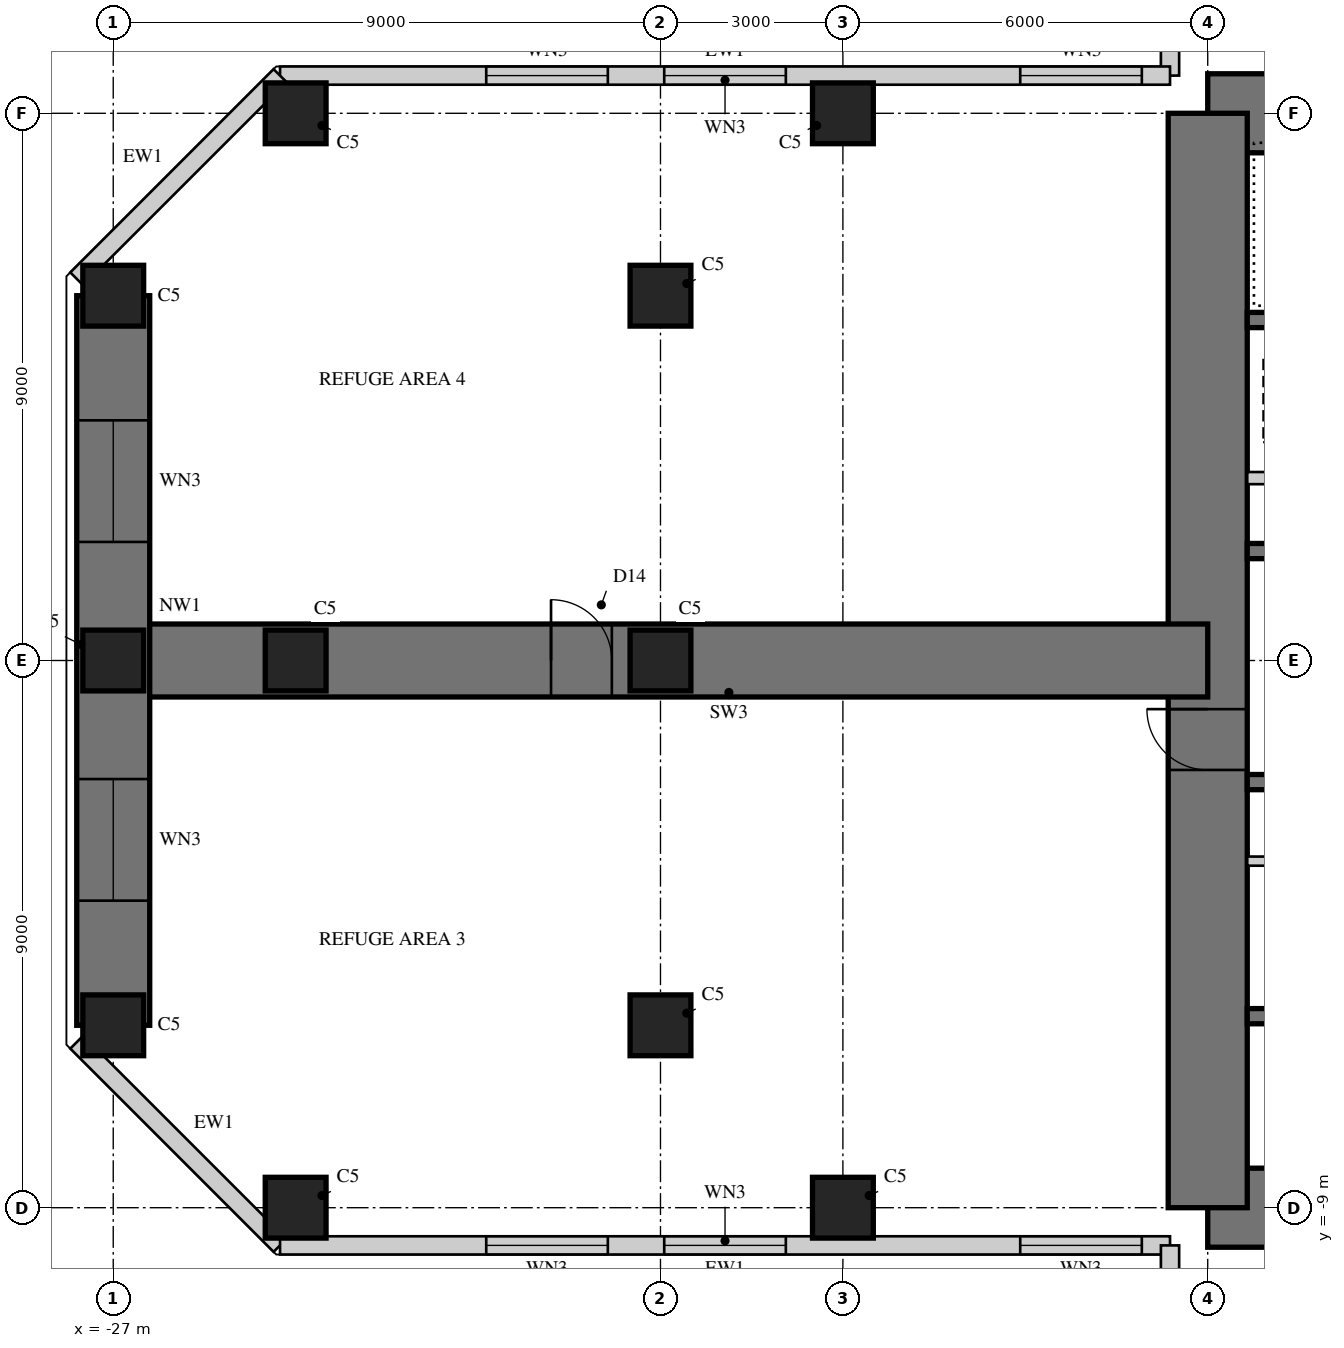
"""IFC4 building model, lengths in metres.
Left out: names, types, materials, properties, quantities, classifications, styles, units other than length and angle.
Written with IfcOpenShell. Run it as: python <this file> out.ifc"""

import sys

from ifc_helpers import new_model, si_unit, direction, frame, frame_2d, origin, origin_2d, place, context, subcontext, project, spatial, rectangle, hollow_rectangle, extrude, element, fill, save


model = new_model("IFC4")
c1 = context("Model", 3, precision=1e-05, world=origin(), true_north=direction((0.0, 1.0)))
c2 = subcontext(c1, "Body", "Model", "MODEL_VIEW")
j1 = project(units=[si_unit("LENGTHUNIT", "METRE"), si_unit("PLANEANGLEUNIT", "RADIAN")], contexts=[c1])
p1 = place(None, origin())
s1 = spatial("IfcSite", under=j1, at=p1, CompositionType="ELEMENT")
p2 = place(p1, origin())
s2 = spatial("IfcBuilding", under=s1, at=p2, CompositionType="ELEMENT")
p3 = place(p2, frame((0.0, 0.0, 164.5)))
s3 = spatial("IfcBuildingStorey", under=s2, at=p3, CompositionType="ELEMENT", Elevation=164.5)
p4 = place(p3, frame((9.0, 9.0, 0.0), z_axis=(0.0, 0.0, 1.0), x_axis=(-1.0, 0.0, 0.0)))
e1 = element("IfcWall", 1, at=p4, inside=s3, PredefinedType="SHEAR", context=c2, shape_type="SweptSolid", body=[
    extrude(rectangle(XDim=18.0, YDim=1.3, at=frame_2d((9.0, 0.0))), origin(), (0.0, 0.0, 1.0), 5.0),
])
p5 = place(p4, frame((9.8, 0.0, 0.0)))
e2 = element("IfcOpeningElement", 2, at=p5, cuts=e1, PredefinedType="OPENING", context=c2, shape_type="SweptSolid", body=[
    extrude(rectangle(XDim=1.0, YDim=2.4, at=frame_2d((0.5, 1.2))), frame((0.0, 0.66, 0.0), z_axis=(0.0, -1.0, 0.0), x_axis=(1.0, 0.0, 0.0)), (0.0, 0.0, 1.0), 1.32),
])
p6 = place(p3, frame((-9.0, -9.0, 0.0), z_axis=(0.0, 0.0, 1.0), x_axis=(1.0, 0.0, 0.0)))
e3 = element("IfcWall", 3, at=p6, inside=s3, PredefinedType="SHEAR", context=c2, shape_type="SweptSolid", body=[
    extrude(rectangle(XDim=18.0, YDim=1.3, at=frame_2d((9.0, 0.0))), origin(), (0.0, 0.0, 1.0), 5.0),
])
p7 = place(p6, frame((9.8, 0.0, 0.0)))
e4 = element("IfcOpeningElement", 4, at=p7, cuts=e3, PredefinedType="OPENING", context=c2, shape_type="SweptSolid", body=[
    extrude(rectangle(XDim=1.0, YDim=2.4, at=frame_2d((0.5, 1.2))), frame((0.0, 0.66, 0.0), z_axis=(0.0, -1.0, 0.0), x_axis=(1.0, 0.0, 0.0)), (0.0, 0.0, 1.0), 1.32),
])
p8 = place(p3, frame((-9.0, 9.0, 0.0), z_axis=(0.0, 0.0, 1.0), x_axis=(0.0, -1.0, 0.0)))
e5 = element("IfcWall", 5, at=p8, inside=s3, PredefinedType="SHEAR", context=c2, shape_type="SweptSolid", body=[
    extrude(rectangle(XDim=18.0, YDim=1.3, at=frame_2d((9.0, 0.0))), origin(), (0.0, 0.0, 1.0), 5.0),
])
p9 = place(p8, frame((9.8, 0.0, 0.0)))
e6 = element("IfcOpeningElement", 6, at=p9, cuts=e5, PredefinedType="OPENING", context=c2, shape_type="SweptSolid", body=[
    extrude(rectangle(XDim=1.0, YDim=2.4, at=frame_2d((0.5, 1.2))), frame((0.0, 0.66, 0.0), z_axis=(0.0, -1.0, 0.0), x_axis=(1.0, 0.0, 0.0)), (0.0, 0.0, 1.0), 1.32),
])
p10 = place(p3, frame((-2.125, 1.8, 0.0), z_axis=(0.0, 0.0, 1.0), x_axis=(-1.0, 0.0, 0.0)))
e7 = element("IfcWall", 7, at=p10, inside=s3, PredefinedType="SHEAR", context=c2, shape_type="SweptSolid", body=[
    extrude(rectangle(XDim=6.225, YDim=0.25, at=frame_2d((3.113, 0.0))), origin(), (0.0, 0.0, 1.0), 5.0),
])
p11 = place(p3, frame((-2.125, 5.6, 0.0), z_axis=(0.0, 0.0, 1.0), x_axis=(-1.0, 0.0, 0.0)))
e8 = element("IfcWall", 8, at=p11, inside=s3, PredefinedType="SHEAR", context=c2, shape_type="SweptSolid", body=[
    extrude(rectangle(XDim=6.225, YDim=0.25, at=frame_2d((3.113, 0.0))), origin(), (0.0, 0.0, 1.0), 5.0),
])
p12 = place(p11, frame((0.175, 0.0, 0.0)))
e9 = element("IfcOpeningElement", 9, at=p12, cuts=e8, PredefinedType="OPENING", context=c2, shape_type="SweptSolid", body=[
    extrude(rectangle(XDim=1.0, YDim=2.1, at=frame_2d((0.5, 1.05))), frame((0.0, 0.135, 0.0), z_axis=(0.0, -1.0, 0.0), x_axis=(1.0, 0.0, 0.0)), (0.0, 0.0, 1.0), 0.27),
])
p13 = place(p3, frame((-5.725, 3.0, 0.0), z_axis=(0.0, 0.0, 1.0), x_axis=(-1.0, 0.0, 0.0)))
e10 = element("IfcWall", 10, at=p13, inside=s3, PredefinedType="PARTITIONING", context=c2, shape_type="SweptSolid", body=[
    extrude(rectangle(XDim=2.625, YDim=0.2, at=frame_2d((1.312, 0.0))), origin(), (0.0, 0.0, 1.0), 5.0),
])
for number, where, z_axis, x_axis in (
    (11, (-1.925, -2.0, 0.0), (0.0, 0.0, 1.0), (-1.0, 0.0, 0.0)),
    (12, (-1.925, -5.85, 0.0), (0.0, 0.0, 1.0), (-1.0, 0.0, 0.0)),
):
    element("IfcWall", number, at=place(p3, frame(where, z_axis=z_axis, x_axis=x_axis)), inside=s3, PredefinedType="SHEAR", context=c2, shape_type="SweptSolid", body=[
        extrude(rectangle(XDim=6.425, YDim=0.25, at=frame_2d((3.212, 0.0))), origin(), (0.0, 0.0, 1.0), 5.0),
    ])
p14 = place(p3, frame((-1.925, -3.3, 0.0), z_axis=(0.0, 0.0, 1.0), x_axis=(-1.0, 0.0, 0.0)))
e13 = element("IfcWall", 13, at=p14, inside=s3, PredefinedType="PARTITIONING", context=c2, shape_type="SweptSolid", body=[
    extrude(rectangle(XDim=6.425, YDim=0.15, at=frame_2d((3.212, 0.0))), origin(), (0.0, 0.0, 1.0), 5.0),
])
p15 = place(p14, frame((0.075, 0.0, 0.0)))
e14 = element("IfcOpeningElement", 14, at=p15, cuts=e13, PredefinedType="OPENING", context=c2, shape_type="SweptSolid", body=[
    extrude(rectangle(XDim=0.8, YDim=2.1, at=frame_2d((0.4, 1.05))), frame((0.0, 0.085, 0.0), z_axis=(0.0, -1.0, 0.0), x_axis=(1.0, 0.0, 0.0)), (0.0, 0.0, 1.0), 0.17),
])
p16 = place(p14, frame((3.675, 0.0, 0.0)))
e15 = element("IfcOpeningElement", 15, at=p16, cuts=e13, PredefinedType="OPENING", context=c2, shape_type="SweptSolid", body=[
    extrude(rectangle(XDim=0.8, YDim=2.1, at=frame_2d((0.4, 1.05))), frame((0.0, 0.085, 0.0), z_axis=(0.0, -1.0, 0.0), x_axis=(1.0, 0.0, 0.0)), (0.0, 0.0, 1.0), 0.17),
])
p17 = place(p3, frame((-9.0, 0.0, 0.0), z_axis=(0.0, 0.0, 1.0), x_axis=(-1.0, 0.0, 0.0)))
e16 = element("IfcWall", 16, at=p17, inside=s3, PredefinedType="SHEAR", context=c2, shape_type="SweptSolid", body=[
    extrude(rectangle(XDim=18.0, YDim=1.2, at=frame_2d((9.0, 0.0))), origin(), (0.0, 0.0, 1.0), 5.0),
])
p18 = place(p17, frame((9.8, 0.0, 0.0)))
e17 = element("IfcOpeningElement", 17, at=p18, cuts=e16, PredefinedType="OPENING", context=c2, shape_type="SweptSolid", body=[
    extrude(rectangle(XDim=1.0, YDim=2.2, at=frame_2d((0.5, 1.1))), frame((0.0, 0.61, 0.0), z_axis=(0.0, -1.0, 0.0), x_axis=(1.0, 0.0, 0.0)), (0.0, 0.0, 1.0), 1.22),
])
p19 = place(p3, frame((-27.0, 6.0, 0.0), z_axis=(0.0, 0.0, 1.0), x_axis=(0.0, -1.0, 0.0)))
e18 = element("IfcWall", 18, at=p19, inside=s3, PredefinedType="SHEAR", context=c2, shape_type="SweptSolid", body=[
    extrude(rectangle(XDim=12.0, YDim=1.2, at=frame_2d((6.0, 0.0))), origin(), (0.0, 0.0, 1.0), 5.0),
])
p20 = place(p19, frame((2.05, 0.0, 0.8)))
e19 = element("IfcOpeningElement", 19, at=p20, cuts=e18, PredefinedType="OPENING", context=c2, shape_type="SweptSolid", body=[
    extrude(rectangle(XDim=2.0, YDim=2.5, at=frame_2d((1.0, 1.25))), frame((0.0, 0.61, 0.0), z_axis=(0.0, -1.0, 0.0), x_axis=(1.0, 0.0, 0.0)), (0.0, 0.0, 1.0), 1.22),
])
p21 = place(p19, frame((7.95, 0.0, 0.8)))
e20 = element("IfcOpeningElement", 20, at=p21, cuts=e18, PredefinedType="OPENING", context=c2, shape_type="SweptSolid", body=[
    extrude(rectangle(XDim=2.0, YDim=2.5, at=frame_2d((1.0, 1.25))), frame((0.0, 0.61, 0.0), z_axis=(0.0, -1.0, 0.0), x_axis=(1.0, 0.0, 0.0)), (0.0, 0.0, 1.0), 1.22),
])
for number, where, z_axis, x_axis in (
    (21, (-15.0, 9.0, 0.0), (0.0, 0.0, 1.0), (1.0, 0.0, 0.0)),
    (22, (-24.0, 9.0, 0.0), (0.0, 0.0, 1.0), (1.0, 0.0, 0.0)),
    (23, (-15.0, -9.0, 0.0), (0.0, 0.0, 1.0), (1.0, 0.0, 0.0)),
    (24, (-24.0, -9.0, 0.0), (0.0, 0.0, 1.0), (1.0, 0.0, 0.0)),
    (25, (-27.0, 6.0, 0.0), (0.0, 0.0, 1.0), (1.0, 0.0, 0.0)),
    (26, (-27.0, 0.0, 0.0), (0.0, 0.0, 1.0), (1.0, 0.0, 0.0)),
    (27, (-27.0, -6.0, 0.0), (0.0, 0.0, 1.0), (1.0, 0.0, 0.0)),
    (28, (-18.0, 6.0, 0.0), (0.0, 0.0, 1.0), (1.0, 0.0, 0.0)),
    (29, (-18.0, 0.0, 0.0), (0.0, 0.0, 1.0), (1.0, 0.0, 0.0)),
    (30, (-18.0, -6.0, 0.0), (0.0, 0.0, 1.0), (1.0, 0.0, 0.0)),
    (31, (-24.0, 0.0, 0.0), (0.0, 0.0, 1.0), (1.0, 0.0, 0.0)),
):
    element("IfcColumn", number, at=place(p3, frame(where, z_axis=z_axis, x_axis=x_axis)), inside=s3, PredefinedType="COLUMN", context=c2, shape_type="SweptSolid", body=[
        extrude(rectangle(XDim=1.0, YDim=1.0, at=origin_2d()), origin(), (0.0, 0.0, 1.0), 5.0),
    ])
p22 = place(p3, frame((-9.62, 15.257, 0.0), z_axis=(0.0, 0.0, 1.0), x_axis=(0.0, -1.0, 0.0)))
e32 = element("IfcWall", 32, at=p22, inside=s3, PredefinedType="SOLIDWALL", context=c2, shape_type="SweptSolid", body=[
    extrude(rectangle(XDim=5.637, YDim=0.3, at=frame_2d((2.818, 0.0))), origin(), (0.0, 0.0, 1.0), 4.82),
])
p23 = place(p3, frame((-9.62, 9.62, 0.0), z_axis=(0.0, 0.0, 1.0), x_axis=(-1.0, 0.0, 0.0)))
e33 = element("IfcWall", 33, at=p23, inside=s3, PredefinedType="SOLIDWALL", context=c2, shape_type="SweptSolid", body=[
    extrude(rectangle(XDim=14.637, YDim=0.3, at=frame_2d((7.318, 0.0))), origin(), (0.0, 0.0, 1.0), 4.82),
])
p24 = place(p23, frame((0.464, 0.0, 0.8)))
e34 = element("IfcOpeningElement", 34, at=p24, cuts=e33, PredefinedType="OPENING", context=c2, shape_type="SweptSolid", body=[
    extrude(rectangle(XDim=2.0, YDim=2.5, at=frame_2d((1.0, 1.25))), frame((0.0, 0.16, 0.0), z_axis=(0.0, -1.0, 0.0), x_axis=(1.0, 0.0, 0.0)), (0.0, 0.0, 1.0), 0.32),
])
p25 = place(p23, frame((6.318, 0.0, 0.8)))
e35 = element("IfcOpeningElement", 35, at=p25, cuts=e33, PredefinedType="OPENING", context=c2, shape_type="SweptSolid", body=[
    extrude(rectangle(XDim=2.0, YDim=2.5, at=frame_2d((1.0, 1.25))), frame((0.0, 0.16, 0.0), z_axis=(0.0, -1.0, 0.0), x_axis=(1.0, 0.0, 0.0)), (0.0, 0.0, 1.0), 0.32),
])
p26 = place(p23, frame((9.246, 0.0, 0.8)))
e36 = element("IfcOpeningElement", 36, at=p26, cuts=e33, PredefinedType="OPENING", context=c2, shape_type="SweptSolid", body=[
    extrude(rectangle(XDim=2.0, YDim=2.5, at=frame_2d((1.0, 1.25))), frame((0.0, 0.16, 0.0), z_axis=(0.0, -1.0, 0.0), x_axis=(1.0, 0.0, 0.0)), (0.0, 0.0, 1.0), 0.32),
])
for number, where, z_axis, x_axis in (
    (37, (-24.257, 9.62, 0.0), (0.0, 0.0, 1.0), (-0.707, -0.707, 0.0)),
    (38, (-27.6, -6.277, 0.0), (0.0, 0.0, 1.0), (0.707, -0.707, 0.0)),
):
    element("IfcWall", number, at=place(p3, frame(where, z_axis=z_axis, x_axis=x_axis)), inside=s3, PredefinedType="SOLIDWALL", context=c2, shape_type="SweptSolid", body=[
        extrude(rectangle(XDim=4.728, YDim=0.3, at=frame_2d((2.364, 0.0))), origin(), (0.0, 0.0, 1.0), 4.82),
    ])
p27 = place(p3, frame((-24.257, -9.62, 0.0), z_axis=(0.0, 0.0, 1.0), x_axis=(1.0, 0.0, 0.0)))
e39 = element("IfcWall", 39, at=p27, inside=s3, PredefinedType="SOLIDWALL", context=c2, shape_type="SweptSolid", body=[
    extrude(rectangle(XDim=14.637, YDim=0.3, at=frame_2d((7.318, 0.0))), origin(), (0.0, 0.0, 1.0), 4.82),
])
p28 = place(p27, frame((3.391, 0.0, 0.8)))
e40 = element("IfcOpeningElement", 40, at=p28, cuts=e39, PredefinedType="OPENING", context=c2, shape_type="SweptSolid", body=[
    extrude(rectangle(XDim=2.0, YDim=2.5, at=frame_2d((1.0, 1.25))), frame((0.0, 0.16, 0.0), z_axis=(0.0, -1.0, 0.0), x_axis=(1.0, 0.0, 0.0)), (0.0, 0.0, 1.0), 0.32),
])
p29 = place(p27, frame((6.318, 0.0, 0.8)))
e41 = element("IfcOpeningElement", 41, at=p29, cuts=e39, PredefinedType="OPENING", context=c2, shape_type="SweptSolid", body=[
    extrude(rectangle(XDim=2.0, YDim=2.5, at=frame_2d((1.0, 1.25))), frame((0.0, 0.16, 0.0), z_axis=(0.0, -1.0, 0.0), x_axis=(1.0, 0.0, 0.0)), (0.0, 0.0, 1.0), 0.32),
])
p30 = place(p27, frame((12.173, 0.0, 0.8)))
e42 = element("IfcOpeningElement", 42, at=p30, cuts=e39, PredefinedType="OPENING", context=c2, shape_type="SweptSolid", body=[
    extrude(rectangle(XDim=2.0, YDim=2.5, at=frame_2d((1.0, 1.25))), frame((0.0, 0.16, 0.0), z_axis=(0.0, -1.0, 0.0), x_axis=(1.0, 0.0, 0.0)), (0.0, 0.0, 1.0), 0.32),
])
p31 = place(p3, frame((-9.62, -9.62, 0.0), z_axis=(0.0, 0.0, 1.0), x_axis=(0.0, -1.0, 0.0)))
e43 = element("IfcWall", 43, at=p31, inside=s3, PredefinedType="SOLIDWALL", context=c2, shape_type="SweptSolid", body=[
    extrude(rectangle(XDim=14.637, YDim=0.3, at=frame_2d((7.318, 0.0))), origin(), (0.0, 0.0, 1.0), 4.82),
])
p32 = place(p24, origin())
e44 = element("IfcWindow", 44, at=p32, inside=s3, PartitioningType="SINGLE_PANEL", PredefinedType="WINDOW", context=c2, shape_type="SweptSolid", body=[
    extrude(hollow_rectangle(XDim=2.0, YDim=2.5, WallThickness=0.06, at=frame_2d((1.0, 1.25))), frame((0.0, 0.03, 0.0), z_axis=(0.0, -1.0, 0.0), x_axis=(1.0, 0.0, 0.0)), (0.0, 0.0, 1.0), 0.06),
    extrude(rectangle(XDim=1.879, YDim=2.379, at=frame_2d((1.0, 1.25))), frame((0.0, 0.03, 0.0), z_axis=(0.0, -1.0, 0.0), x_axis=(1.0, 0.0, 0.0)), (0.0, 0.0, 1.0), 0.06),
])
fill(e34, e44)
p33 = place(p25, origin())
e45 = element("IfcWindow", 45, at=p33, inside=s3, PartitioningType="SINGLE_PANEL", PredefinedType="WINDOW", context=c2, shape_type="SweptSolid", body=[
    extrude(hollow_rectangle(XDim=2.0, YDim=2.5, WallThickness=0.06, at=frame_2d((1.0, 1.25))), frame((0.0, 0.03, 0.0), z_axis=(0.0, -1.0, 0.0), x_axis=(1.0, 0.0, 0.0)), (0.0, 0.0, 1.0), 0.06),
    extrude(rectangle(XDim=1.879, YDim=2.379, at=frame_2d((1.0, 1.25))), frame((0.0, 0.03, 0.0), z_axis=(0.0, -1.0, 0.0), x_axis=(1.0, 0.0, 0.0)), (0.0, 0.0, 1.0), 0.06),
])
fill(e35, e45)
p34 = place(p26, origin())
e46 = element("IfcWindow", 46, at=p34, inside=s3, PartitioningType="SINGLE_PANEL", PredefinedType="WINDOW", context=c2, shape_type="SweptSolid", body=[
    extrude(hollow_rectangle(XDim=2.0, YDim=2.5, WallThickness=0.06, at=frame_2d((1.0, 1.25))), frame((0.0, 0.03, 0.0), z_axis=(0.0, -1.0, 0.0), x_axis=(1.0, 0.0, 0.0)), (0.0, 0.0, 1.0), 0.06),
    extrude(rectangle(XDim=1.879, YDim=2.379, at=frame_2d((1.0, 1.25))), frame((0.0, 0.03, 0.0), z_axis=(0.0, -1.0, 0.0), x_axis=(1.0, 0.0, 0.0)), (0.0, 0.0, 1.0), 0.06),
])
fill(e36, e46)
p35 = place(p20, origin())
e47 = element("IfcWindow", 47, at=p35, inside=s3, PartitioningType="SINGLE_PANEL", PredefinedType="WINDOW", context=c2, shape_type="SweptSolid", body=[
    extrude(hollow_rectangle(XDim=2.0, YDim=2.5, WallThickness=0.06, at=frame_2d((1.0, 1.25))), frame((0.0, 0.03, 0.0), z_axis=(0.0, -1.0, 0.0), x_axis=(1.0, 0.0, 0.0)), (0.0, 0.0, 1.0), 0.06),
    extrude(rectangle(XDim=1.879, YDim=2.379, at=frame_2d((1.0, 1.25))), frame((0.0, 0.03, 0.0), z_axis=(0.0, -1.0, 0.0), x_axis=(1.0, 0.0, 0.0)), (0.0, 0.0, 1.0), 0.06),
])
fill(e19, e47)
p36 = place(p21, origin())
e48 = element("IfcWindow", 48, at=p36, inside=s3, PartitioningType="SINGLE_PANEL", PredefinedType="WINDOW", context=c2, shape_type="SweptSolid", body=[
    extrude(hollow_rectangle(XDim=2.0, YDim=2.5, WallThickness=0.06, at=frame_2d((1.0, 1.25))), frame((0.0, 0.03, 0.0), z_axis=(0.0, -1.0, 0.0), x_axis=(1.0, 0.0, 0.0)), (0.0, 0.0, 1.0), 0.06),
    extrude(rectangle(XDim=1.879, YDim=2.379, at=frame_2d((1.0, 1.25))), frame((0.0, 0.03, 0.0), z_axis=(0.0, -1.0, 0.0), x_axis=(1.0, 0.0, 0.0)), (0.0, 0.0, 1.0), 0.06),
])
fill(e20, e48)
p37 = place(p28, origin())
e49 = element("IfcWindow", 49, at=p37, inside=s3, PartitioningType="SINGLE_PANEL", PredefinedType="WINDOW", context=c2, shape_type="SweptSolid", body=[
    extrude(hollow_rectangle(XDim=2.0, YDim=2.5, WallThickness=0.06, at=frame_2d((1.0, 1.25))), frame((0.0, 0.03, 0.0), z_axis=(0.0, -1.0, 0.0), x_axis=(1.0, 0.0, 0.0)), (0.0, 0.0, 1.0), 0.06),
    extrude(rectangle(XDim=1.879, YDim=2.379, at=frame_2d((1.0, 1.25))), frame((0.0, 0.03, 0.0), z_axis=(0.0, -1.0, 0.0), x_axis=(1.0, 0.0, 0.0)), (0.0, 0.0, 1.0), 0.06),
])
fill(e40, e49)
p38 = place(p29, origin())
e50 = element("IfcWindow", 50, at=p38, inside=s3, PartitioningType="SINGLE_PANEL", PredefinedType="WINDOW", context=c2, shape_type="SweptSolid", body=[
    extrude(hollow_rectangle(XDim=2.0, YDim=2.5, WallThickness=0.06, at=frame_2d((1.0, 1.25))), frame((0.0, 0.03, 0.0), z_axis=(0.0, -1.0, 0.0), x_axis=(1.0, 0.0, 0.0)), (0.0, 0.0, 1.0), 0.06),
    extrude(rectangle(XDim=1.879, YDim=2.379, at=frame_2d((1.0, 1.25))), frame((0.0, 0.03, 0.0), z_axis=(0.0, -1.0, 0.0), x_axis=(1.0, 0.0, 0.0)), (0.0, 0.0, 1.0), 0.06),
])
fill(e41, e50)
p39 = place(p30, origin())
e51 = element("IfcWindow", 51, at=p39, inside=s3, PartitioningType="SINGLE_PANEL", PredefinedType="WINDOW", context=c2, shape_type="SweptSolid", body=[
    extrude(hollow_rectangle(XDim=2.0, YDim=2.5, WallThickness=0.06, at=frame_2d((1.0, 1.25))), frame((0.0, 0.03, 0.0), z_axis=(0.0, -1.0, 0.0), x_axis=(1.0, 0.0, 0.0)), (0.0, 0.0, 1.0), 0.06),
    extrude(rectangle(XDim=1.879, YDim=2.379, at=frame_2d((1.0, 1.25))), frame((0.0, 0.03, 0.0), z_axis=(0.0, -1.0, 0.0), x_axis=(1.0, 0.0, 0.0)), (0.0, 0.0, 1.0), 0.06),
])
fill(e42, e51)
p40 = place(p18, frame((1.0, 0.0, 0.0), z_axis=(0.0, 0.0, 1.0), x_axis=(-1.0, 0.0, 0.0)))
e52 = element("IfcDoor", 52, at=p40, inside=s3, OperationType="SINGLE_SWING_LEFT", PredefinedType="DOOR", context=c2, shape_type="SweptSolid", body=[
    extrude(rectangle(XDim=1.0, YDim=2.2, at=frame_2d((0.5, 1.1))), frame((0.0, 0.025, 0.0), z_axis=(0.0, -1.0, 0.0), x_axis=(1.0, 0.0, 0.0)), (0.0, 0.0, 1.0), 0.05),
])
fill(e17, e52)
p41 = place(p9, frame((1.0, 0.0, 0.0), z_axis=(0.0, 0.0, 1.0), x_axis=(-1.0, 0.0, 0.0)))
e53 = element("IfcDoor", 53, at=p41, inside=s3, OperationType="SINGLE_SWING_RIGHT", PredefinedType="DOOR", context=c2, shape_type="SweptSolid", body=[
    extrude(rectangle(XDim=1.0, YDim=2.4, at=frame_2d((0.5, 1.2))), frame((0.0, -0.005, 0.0), z_axis=(0.0, -1.0, 0.0), x_axis=(1.0, 0.0, 0.0)), (0.0, 0.0, 1.0), 0.05),
])
fill(e6, e53)
save(model, sys.argv[1])
